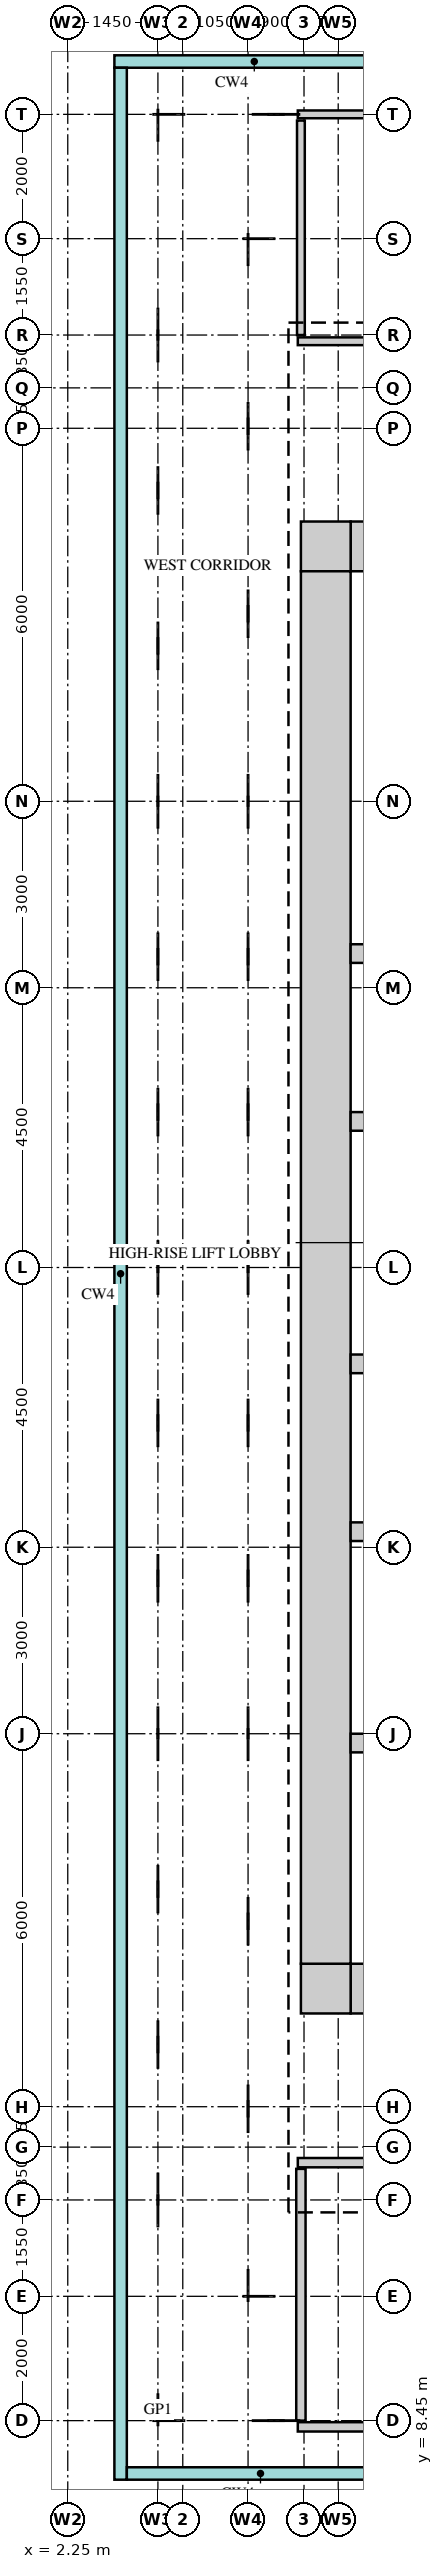
"""IFC4 building model, lengths in metres.
Left out: names, types, materials, properties, quantities, classifications, styles, units other than length and angle.
Written with IfcOpenShell. Run it as: python <this file> out.ifc"""

import sys

from ifc_helpers import new_model, si_unit, direction, frame, frame_2d, origin, place, context, subcontext, project, spatial, rectangle, extrude, source, transform, mapped, element, save


model = new_model("IFC4")
c1 = context("Model", 3, precision=1e-05, world=origin(), true_north=direction((0.0, 1.0)))
c2 = subcontext(c1, "Body", "Model", "MODEL_VIEW")
j1 = project(units=[si_unit("LENGTHUNIT", "METRE"), si_unit("PLANEANGLEUNIT", "RADIAN")], contexts=[c1])
p1 = place(None, origin())
s1 = spatial("IfcSite", under=j1, at=p1, CompositionType="ELEMENT")
p2 = place(p1, origin())
s2 = spatial("IfcBuilding", under=s1, at=p2, CompositionType="ELEMENT")
p3 = place(p2, frame((0.0, 0.0, 216.7)))
s3 = spatial("IfcBuildingStorey", under=s2, at=p3, CompositionType="ELEMENT", Elevation=216.7)
m1 = source(origin(), c2, "Body", "SweptSolid", [
    extrude(rectangle(XDim=13.4, YDim=0.8, at=frame_2d((6.7, 0.0))), origin(), (0.0, 0.0, 1.0), 5.25),
])
p4 = place(p3, frame((6.8, 38.6, 0.0), z_axis=(0.0, 0.0, 1.0), x_axis=(1.0, 0.0, 0.0)))
e1 = element("IfcWall", 1, at=p4, inside=s3, PredefinedType="SHEAR", context=c2, shape_type="MappedRepresentation", body=[
    mapped(m1, transform((0.0, 0.0, 0.0))),
])
m2 = source(origin(), c2, "Body", "SweptSolid", [
    extrude(rectangle(XDim=0.9, YDim=2.1, at=frame_2d((0.45, 1.05))), frame((0.0, 0.41, 0.0), z_axis=(0.0, -1.0, 0.0), x_axis=(1.0, 0.0, 0.0)), (0.0, 0.0, 1.0), 0.82),
])
p5 = place(p4, frame((2.9, 0.0, 0.0)))
e2 = element("IfcOpeningElement", 2, at=p5, cuts=e1, PredefinedType="OPENING", context=c2, shape_type="MappedRepresentation", body=[
    mapped(m2, transform((0.0, 0.0, 0.0))),
])
p6 = place(p4, frame((9.6, 0.0, 0.0)))
e3 = element("IfcOpeningElement", 3, at=p6, cuts=e1, PredefinedType="OPENING", context=c2, shape_type="MappedRepresentation", body=[
    mapped(m2, transform((0.0, 0.0, 0.0))),
])
m3 = source(origin(), c2, "Body", "SweptSolid", [
    extrude(rectangle(XDim=0.8, YDim=0.8, at=frame_2d((0.4, 0.0))), origin(), (0.0, 0.0, 1.0), 5.25),
])
p7 = place(p3, frame((6.0, 38.6, 0.0), z_axis=(0.0, 0.0, 1.0), x_axis=(1.0, 0.0, 0.0)))
e4 = element("IfcWall", 4, at=p7, inside=s3, PredefinedType="SHEAR", context=c2, shape_type="MappedRepresentation", body=[
    mapped(m3, transform((0.0, 0.0, 0.0))),
])
p8 = place(p3, frame((6.8, 15.4, 0.0), z_axis=(0.0, 0.0, 1.0), x_axis=(1.0, 0.0, 0.0)))
e5 = element("IfcWall", 5, at=p8, inside=s3, PredefinedType="SHEAR", context=c2, shape_type="MappedRepresentation", body=[
    mapped(m1, transform((0.0, 0.0, 0.0))),
])
m4 = source(origin(), c2, "Body", "SweptSolid", [
    extrude(rectangle(XDim=1.2, YDim=2.1, at=frame_2d((0.6, 1.05))), frame((0.0, 0.41, 0.0), z_axis=(0.0, -1.0, 0.0), x_axis=(1.0, 0.0, 0.0)), (0.0, 0.0, 1.0), 0.82),
])
p9 = place(p8, frame((5.4, 0.0, 0.0)))
e6 = element("IfcOpeningElement", 6, at=p9, cuts=e5, PredefinedType="OPENING", context=c2, shape_type="MappedRepresentation", body=[
    mapped(m4, transform((0.0, 0.0, 0.0))),
])
p10 = place(p8, frame((2.05, 0.0, 0.0)))
e7 = element("IfcOpeningElement", 7, at=p10, cuts=e5, PredefinedType="OPENING", context=c2, shape_type="MappedRepresentation", body=[
    mapped(m4, transform((0.0, 0.0, 0.0))),
])
m5 = source(origin(), c2, "Body", "SweptSolid", [
    extrude(rectangle(XDim=1.0, YDim=2.1, at=frame_2d((0.5, 1.05))), frame((0.0, 0.41, 0.0), z_axis=(0.0, -1.0, 0.0), x_axis=(1.0, 0.0, 0.0)), (0.0, 0.0, 1.0), 0.82),
])
p11 = place(p8, frame((7.9, 0.0, 0.0)))
e8 = element("IfcOpeningElement", 8, at=p11, cuts=e5, PredefinedType="OPENING", context=c2, shape_type="MappedRepresentation", body=[
    mapped(m5, transform((0.0, 0.0, 0.0))),
])
p12 = place(p3, frame((6.0, 15.4, 0.0), z_axis=(0.0, 0.0, 1.0), x_axis=(1.0, 0.0, 0.0)))
e9 = element("IfcWall", 9, at=p12, inside=s3, PredefinedType="SHEAR", context=c2, shape_type="MappedRepresentation", body=[
    mapped(m3, transform((0.0, 0.0, 0.0))),
])
m6 = source(origin(), c2, "Body", "SweptSolid", [
    extrude(rectangle(XDim=22.4, YDim=0.8, at=frame_2d((11.2, 0.0))), origin(), (0.0, 0.0, 1.0), 5.25),
])
p13 = place(p3, frame((6.4, 15.8, 0.0), z_axis=(0.0, 0.0, 1.0), x_axis=(0.0, 1.0, 0.0)))
e10 = element("IfcWall", 10, at=p13, inside=s3, PredefinedType="SHEAR", context=c2, shape_type="MappedRepresentation", body=[
    mapped(m6, transform((0.0, 0.0, 0.0))),
])
m7 = source(origin(), c2, "Body", "SweptSolid", [
    extrude(rectangle(XDim=13.4, YDim=0.3, at=frame_2d((6.7, 0.0))), origin(), (0.0, 0.0, 1.0), 5.25),
])
p14 = place(p3, frame((6.8, 22.75, 0.0), z_axis=(0.0, 0.0, 1.0), x_axis=(1.0, 0.0, 0.0)))
e11 = element("IfcWall", 11, at=p14, inside=s3, PredefinedType="STANDARD", context=c2, shape_type="MappedRepresentation", body=[
    mapped(m7, transform((0.0, 0.0, 0.0))),
])
m8 = source(origin(), c2, "Body", "SweptSolid", [
    extrude(rectangle(XDim=9.275, YDim=0.3, at=frame_2d((4.637, 0.0))), origin(), (0.0, 0.0, 1.0), 5.25),
])
p15 = place(p3, frame((6.8, 19.35, 0.0), z_axis=(0.0, 0.0, 1.0), x_axis=(1.0, 0.0, 0.0)))
e12 = element("IfcWall", 12, at=p15, inside=s3, PredefinedType="STANDARD", context=c2, shape_type="MappedRepresentation", body=[
    mapped(m8, transform((0.0, 0.0, 0.0))),
])
m9 = source(origin(), c2, "Body", "SweptSolid", [
    extrude(rectangle(XDim=1.2, YDim=2.1, at=frame_2d((0.6, 1.05))), frame((0.0, 0.16, 0.0), z_axis=(0.0, -1.0, 0.0), x_axis=(1.0, 0.0, 0.0)), (0.0, 0.0, 1.0), 0.32),
])
p16 = place(p15, frame((0.85, 0.0, 0.0)))
e13 = element("IfcOpeningElement", 13, at=p16, cuts=e12, PredefinedType="OPENING", context=c2, shape_type="MappedRepresentation", body=[
    mapped(m9, transform((0.0, 0.0, 0.0))),
])
p17 = place(p15, frame((3.2, 0.0, 0.0)))
e14 = element("IfcOpeningElement", 14, at=p17, cuts=e12, PredefinedType="OPENING", context=c2, shape_type="MappedRepresentation", body=[
    mapped(m9, transform((0.0, 0.0, 0.0))),
])
p18 = place(p15, frame((5.45, 0.0, 0.0)))
e15 = element("IfcOpeningElement", 15, at=p18, cuts=e12, PredefinedType="OPENING", context=c2, shape_type="MappedRepresentation", body=[
    mapped(m9, transform((0.0, 0.0, 0.0))),
])
p19 = place(p15, frame((7.6, 0.0, 0.0)))
e16 = element("IfcOpeningElement", 16, at=p19, cuts=e12, PredefinedType="OPENING", context=c2, shape_type="MappedRepresentation", body=[
    mapped(m9, transform((0.0, 0.0, 0.0))),
])
p20 = place(p3, frame((6.8, 32.05, 0.0), z_axis=(0.0, 0.0, 1.0), x_axis=(1.0, 0.0, 0.0)))
e17 = element("IfcWall", 17, at=p20, inside=s3, PredefinedType="STANDARD", context=c2, shape_type="MappedRepresentation", body=[
    mapped(m7, transform((0.0, 0.0, 0.0))),
])
p21 = place(p3, frame((6.8, 29.35, 0.0), z_axis=(0.0, 0.0, 1.0), x_axis=(1.0, 0.0, 0.0)))
e18 = element("IfcWall", 18, at=p21, inside=s3, PredefinedType="STANDARD", context=c2, shape_type="MappedRepresentation", body=[
    mapped(m7, transform((0.0, 0.0, 0.0))),
])
p22 = place(p21, frame((0.95, 0.0, 0.0)))
e19 = element("IfcOpeningElement", 19, at=p22, cuts=e18, PredefinedType="OPENING", context=c2, shape_type="MappedRepresentation", body=[
    mapped(m9, transform((0.0, 0.0, 0.0))),
])
p23 = place(p21, frame((3.5, 0.0, 0.0)))
e20 = element("IfcOpeningElement", 20, at=p23, cuts=e18, PredefinedType="OPENING", context=c2, shape_type="MappedRepresentation", body=[
    mapped(m9, transform((0.0, 0.0, 0.0))),
])
p24 = place(p21, frame((6.05, 0.0, 0.0)))
e21 = element("IfcOpeningElement", 21, at=p24, cuts=e18, PredefinedType="OPENING", context=c2, shape_type="MappedRepresentation", body=[
    mapped(m9, transform((0.0, 0.0, 0.0))),
])
p25 = place(p21, frame((8.6, 0.0, 0.0)))
e22 = element("IfcOpeningElement", 22, at=p25, cuts=e18, PredefinedType="OPENING", context=c2, shape_type="MappedRepresentation", body=[
    mapped(m9, transform((0.0, 0.0, 0.0))),
])
p26 = place(p21, frame((11.15, 0.0, 0.0)))
e23 = element("IfcOpeningElement", 23, at=p26, cuts=e18, PredefinedType="OPENING", context=c2, shape_type="MappedRepresentation", body=[
    mapped(m9, transform((0.0, 0.0, 0.0))),
])
p27 = place(p3, frame((6.8, 25.45, 0.0), z_axis=(0.0, 0.0, 1.0), x_axis=(1.0, 0.0, 0.0)))
e24 = element("IfcWall", 24, at=p27, inside=s3, PredefinedType="STANDARD", context=c2, shape_type="MappedRepresentation", body=[
    mapped(m7, transform((0.0, 0.0, 0.0))),
])
p28 = place(p27, frame((0.95, 0.0, 0.0)))
e25 = element("IfcOpeningElement", 25, at=p28, cuts=e24, PredefinedType="OPENING", context=c2, shape_type="MappedRepresentation", body=[
    mapped(m9, transform((0.0, 0.0, 0.0))),
])
p29 = place(p27, frame((3.5, 0.0, 0.0)))
e26 = element("IfcOpeningElement", 26, at=p29, cuts=e24, PredefinedType="OPENING", context=c2, shape_type="MappedRepresentation", body=[
    mapped(m9, transform((0.0, 0.0, 0.0))),
])
p30 = place(p27, frame((6.05, 0.0, 0.0)))
e27 = element("IfcOpeningElement", 27, at=p30, cuts=e24, PredefinedType="OPENING", context=c2, shape_type="MappedRepresentation", body=[
    mapped(m9, transform((0.0, 0.0, 0.0))),
])
p31 = place(p27, frame((8.6, 0.0, 0.0)))
e28 = element("IfcOpeningElement", 28, at=p31, cuts=e24, PredefinedType="OPENING", context=c2, shape_type="MappedRepresentation", body=[
    mapped(m9, transform((0.0, 0.0, 0.0))),
])
p32 = place(p27, frame((11.15, 0.0, 0.0)))
e29 = element("IfcOpeningElement", 29, at=p32, cuts=e24, PredefinedType="OPENING", context=c2, shape_type="MappedRepresentation", body=[
    mapped(m9, transform((0.0, 0.0, 0.0))),
])
m10 = source(origin(), c2, "Body", "SweptSolid", [
    extrude(rectangle(XDim=7.95, YDim=0.15, at=frame_2d((3.975, 0.0))), origin(), (0.0, 0.0, 1.0), 5.25),
])
p33 = place(p3, frame((5.95, 8.35, 0.0), z_axis=(0.0, 0.0, 1.0), x_axis=(1.0, 0.0, 0.0)))
e30 = element("IfcWall", 30, at=p33, inside=s3, PredefinedType="PARTITIONING", context=c2, shape_type="MappedRepresentation", body=[
    mapped(m10, transform((0.0, 0.0, 0.0))),
])
m11 = source(origin(), c2, "Body", "SweptSolid", [
    extrude(rectangle(XDim=0.9, YDim=2.1, at=frame_2d((0.45, 1.05))), frame((0.0, 0.085, 0.0), z_axis=(0.0, -1.0, 0.0), x_axis=(1.0, 0.0, 0.0)), (0.0, 0.0, 1.0), 0.17),
])
p34 = place(p33, frame((3.8, 0.0, 0.0)))
e31 = element("IfcOpeningElement", 31, at=p34, cuts=e30, PredefinedType="OPENING", context=c2, shape_type="MappedRepresentation", body=[
    mapped(m11, transform((0.0, 0.0, 0.0))),
])
m12 = source(origin(), c2, "Body", "SweptSolid", [
    extrude(rectangle(XDim=4.05, YDim=0.15, at=frame_2d((2.025, 0.0))), origin(), (0.0, 0.0, 1.0), 5.25),
])
p35 = place(p3, frame((6.0, 8.45, 0.0), z_axis=(0.0, 0.0, 1.0), x_axis=(0.0, 1.0, 0.0)))
e32 = element("IfcWall", 32, at=p35, inside=s3, PredefinedType="PARTITIONING", context=c2, shape_type="MappedRepresentation", body=[
    mapped(m12, transform((0.0, 0.0, 0.0))),
])
m13 = source(origin(), c2, "Body", "SweptSolid", [
    extrude(rectangle(XDim=8.0, YDim=0.15, at=frame_2d((4.0, 0.0))), origin(), (0.0, 0.0, 1.0), 5.25),
])
p36 = place(p3, frame((5.95, 12.6, 0.0), z_axis=(0.0, 0.0, 1.0), x_axis=(1.0, 0.0, 0.0)))
e33 = element("IfcWall", 33, at=p36, inside=s3, PredefinedType="PARTITIONING", context=c2, shape_type="MappedRepresentation", body=[
    mapped(m13, transform((0.0, 0.0, 0.0))),
])
m14 = source(origin(), c2, "Body", "SweptSolid", [
    extrude(rectangle(XDim=7.95, YDim=0.125, at=frame_2d((3.975, 0.0))), origin(), (0.0, 0.0, 1.0), 5.25),
])
p37 = place(p3, frame((5.95, 41.9, 0.0), z_axis=(0.0, 0.0, 1.0), x_axis=(1.0, 0.0, 0.0)))
e34 = element("IfcWall", 34, at=p37, inside=s3, PredefinedType="PARTITIONING", context=c2, shape_type="MappedRepresentation", body=[
    mapped(m14, transform((0.0, 0.0, 0.0))),
])
m15 = source(origin(), c2, "Body", "SweptSolid", [
    extrude(rectangle(XDim=0.9, YDim=2.1, at=frame_2d((0.45, 1.05))), frame((0.0, 0.073, 0.0), z_axis=(0.0, -1.0, 0.0), x_axis=(1.0, 0.0, 0.0)), (0.0, 0.0, 1.0), 0.145),
])
p38 = place(p37, frame((3.55, 0.0, 0.0)))
e35 = element("IfcOpeningElement", 35, at=p38, cuts=e34, PredefinedType="OPENING", context=c2, shape_type="MappedRepresentation", body=[
    mapped(m15, transform((0.0, 0.0, 0.0))),
])
m16 = source(origin(), c2, "Body", "SweptSolid", [
    extrude(rectangle(XDim=3.45, YDim=0.125, at=frame_2d((1.725, 0.0))), origin(), (0.0, 0.0, 1.0), 5.25),
])
p39 = place(p3, frame((6.0, 42.0, 0.0), z_axis=(0.0, 0.0, 1.0), x_axis=(0.0, 1.0, 0.0)))
e36 = element("IfcWall", 36, at=p39, inside=s3, PredefinedType="PARTITIONING", context=c2, shape_type="MappedRepresentation", body=[
    mapped(m16, transform((0.0, 0.0, 0.0))),
])
p40 = place(p3, frame((5.95, 45.55, 0.0), z_axis=(0.0, 0.0, 1.0), x_axis=(1.0, 0.0, 0.0)))
e37 = element("IfcWall", 37, at=p40, inside=s3, PredefinedType="PARTITIONING", context=c2, shape_type="MappedRepresentation", body=[
    mapped(m14, transform((0.0, 0.0, 0.0))),
])
save(model, sys.argv[1])
